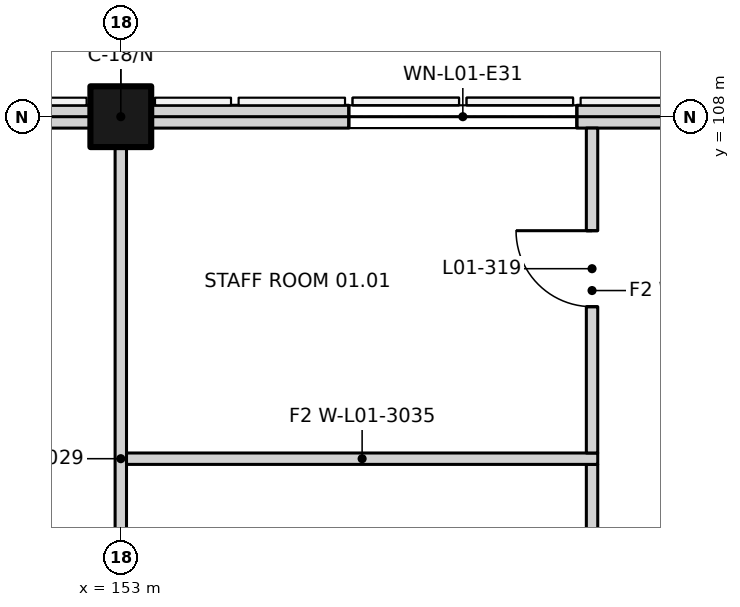
"""IFC4 building model, lengths in metres.
Left out: names, types, materials, properties, quantities, classifications, styles, units other than length and angle.
Written with IfcOpenShell. Run it as: python <this file> out.ifc"""

import sys

from ifc_helpers import new_model, si_unit, direction, frame, frame_2d, origin, origin_2d, place, context, subcontext, project, spatial, rectangle, extrude, element, fill, save


model = new_model("IFC4")
c1 = context("Model", 3, precision=1e-05, world=origin(), true_north=direction((0.0, 1.0)))
c2 = subcontext(c1, "Body", "Model", "MODEL_VIEW")
j1 = project(units=[si_unit("LENGTHUNIT", "METRE"), si_unit("PLANEANGLEUNIT", "RADIAN")], contexts=[c1])
p1 = place(None, origin())
s1 = spatial("IfcSite", under=j1, at=p1, CompositionType="ELEMENT")
p2 = place(p1, origin())
s2 = spatial("IfcBuilding", under=s1, at=p2, CompositionType="ELEMENT")
p3 = place(p2, frame((0.0, 0.0, 6.0)))
s3 = spatial("IfcBuildingStorey", under=s2, at=p3, CompositionType="ELEMENT", Elevation=6.0)
p4 = place(p3, frame((153.0, 108.0, 0.0), z_axis=(0.0, 0.0, 1.0), x_axis=(1.0, 0.0, 0.0)))
e1 = element("IfcColumn", 1, at=p4, inside=s3, PredefinedType="COLUMN", context=c2, shape_type="SweptSolid", body=[
    extrude(rectangle(XDim=0.8, YDim=0.8, at=origin_2d()), origin(), (0.0, 0.0, 1.0), 4.5),
])
p5 = place(p3, frame((144.4, 108.0, 0.0), z_axis=(0.0, 0.0, 1.0), x_axis=(1.0, 0.0, 0.0)))
e2 = element("IfcWall", 2, at=p5, inside=s3, PredefinedType="SOLIDWALL", context=c2, shape_type="SweptSolid", body=[
    extrude(rectangle(XDim=8.2, YDim=0.3, at=frame_2d((4.1, 0.0))), origin(), (0.0, 0.0, 1.0), 3.65),
])
p6 = place(p5, frame((2.6, 0.0, 0.9)))
e3 = element("IfcOpeningElement", 3, at=p6, cuts=e2, PredefinedType="OPENING", context=c2, shape_type="SweptSolid", body=[
    extrude(rectangle(XDim=3.0, YDim=2.1, at=frame_2d((1.5, 1.05))), frame((0.0, 0.16, 0.0), z_axis=(0.0, -1.0, 0.0), x_axis=(1.0, 0.0, 0.0)), (0.0, 0.0, 1.0), 0.32),
])
p7 = place(p3, frame((153.4, 108.0, 0.0), z_axis=(0.0, 0.0, 1.0), x_axis=(1.0, 0.0, 0.0)))
e4 = element("IfcWall", 4, at=p7, inside=s3, PredefinedType="SOLIDWALL", context=c2, shape_type="SweptSolid", body=[
    extrude(rectangle(XDim=8.2, YDim=0.3, at=frame_2d((4.1, 0.0))), origin(), (0.0, 0.0, 1.0), 3.65),
])
p8 = place(p7, frame((2.6, 0.0, 0.9)))
e5 = element("IfcOpeningElement", 5, at=p8, cuts=e4, PredefinedType="OPENING", context=c2, shape_type="SweptSolid", body=[
    extrude(rectangle(XDim=3.0, YDim=2.1, at=frame_2d((1.5, 1.05))), frame((0.0, 0.16, 0.0), z_axis=(0.0, -1.0, 0.0), x_axis=(1.0, 0.0, 0.0)), (0.0, 0.0, 1.0), 0.32),
])
p9 = place(p3, frame((159.2, 93.075, 0.0), z_axis=(0.0, 0.0, 1.0), x_axis=(0.0, 1.0, 0.0)))
e6 = element("IfcWall", 6, at=p9, inside=s3, PredefinedType="PARTITIONING", context=c2, shape_type="SweptSolid", body=[
    extrude(rectangle(XDim=10.35, YDim=0.15, at=frame_2d((5.175, 0.0))), origin(), (0.0, 0.0, 1.0), 4.15),
])
p10 = place(p3, frame((153.0, 99.4, 0.0), z_axis=(0.0, 0.0, 1.0), x_axis=(0.0, 1.0, 0.0)))
e7 = element("IfcWall", 7, at=p10, inside=s3, PredefinedType="PARTITIONING", context=c2, shape_type="SweptSolid", body=[
    extrude(rectangle(XDim=8.2, YDim=0.15, at=frame_2d((4.1, 0.0))), origin(), (0.0, 0.0, 1.0), 4.15),
])
p11 = place(p3, frame((153.075, 103.5, 0.0), z_axis=(0.0, 0.0, 1.0), x_axis=(1.0, 0.0, 0.0)))
e8 = element("IfcWall", 8, at=p11, inside=s3, PredefinedType="PARTITIONING", context=c2, shape_type="SweptSolid", body=[
    extrude(rectangle(XDim=6.2, YDim=0.15, at=frame_2d((3.1, 0.0))), origin(), (0.0, 0.0, 1.0), 4.15),
])
p12 = place(p3, frame((159.2, 103.575, 0.0), z_axis=(0.0, 0.0, 1.0), x_axis=(0.0, 1.0, 0.0)))
e9 = element("IfcWall", 9, at=p12, inside=s3, PredefinedType="PARTITIONING", context=c2, shape_type="SweptSolid", body=[
    extrude(rectangle(XDim=4.275, YDim=0.15, at=frame_2d((2.138, 0.0))), origin(), (0.0, 0.0, 1.0), 3.65),
])
p13 = place(p12, frame((1.925, 0.0, 0.0)))
e10 = element("IfcOpeningElement", 10, at=p13, cuts=e9, PredefinedType="OPENING", context=c2, shape_type="SweptSolid", body=[
    extrude(rectangle(XDim=1.0, YDim=2.1, at=frame_2d((0.5, 1.05))), frame((0.0, 0.085, 0.0), z_axis=(0.0, -1.0, 0.0), x_axis=(1.0, 0.0, 0.0)), (0.0, 0.0, 1.0), 0.17),
])
p14 = place(p8, origin())
e11 = element("IfcWindow", 11, at=p14, inside=s3, PartitioningType="SINGLE_PANEL", PredefinedType="WINDOW", context=c2, shape_type="SweptSolid", body=[
    extrude(rectangle(XDim=3.0, YDim=2.1, at=frame_2d((1.5, 1.05))), frame((0.0, -0.03, 0.0), z_axis=(0.0, -1.0, 0.0), x_axis=(1.0, 0.0, 0.0)), (0.0, 0.0, 1.0), 0.06),
])
fill(e5, e11)
p15 = place(p13, origin())
e12 = element("IfcDoor", 12, at=p15, inside=s3, OperationType="SINGLE_SWING_RIGHT", PredefinedType="DOOR", context=c2, shape_type="SweptSolid", body=[
    extrude(rectangle(XDim=1.0, YDim=2.1, at=frame_2d((0.5, 1.05))), frame((0.0, 0.025, 0.0), z_axis=(0.0, -1.0, 0.0), x_axis=(1.0, 0.0, 0.0)), (0.0, 0.0, 1.0), 0.05),
])
fill(e10, e12)
save(model, sys.argv[1])
